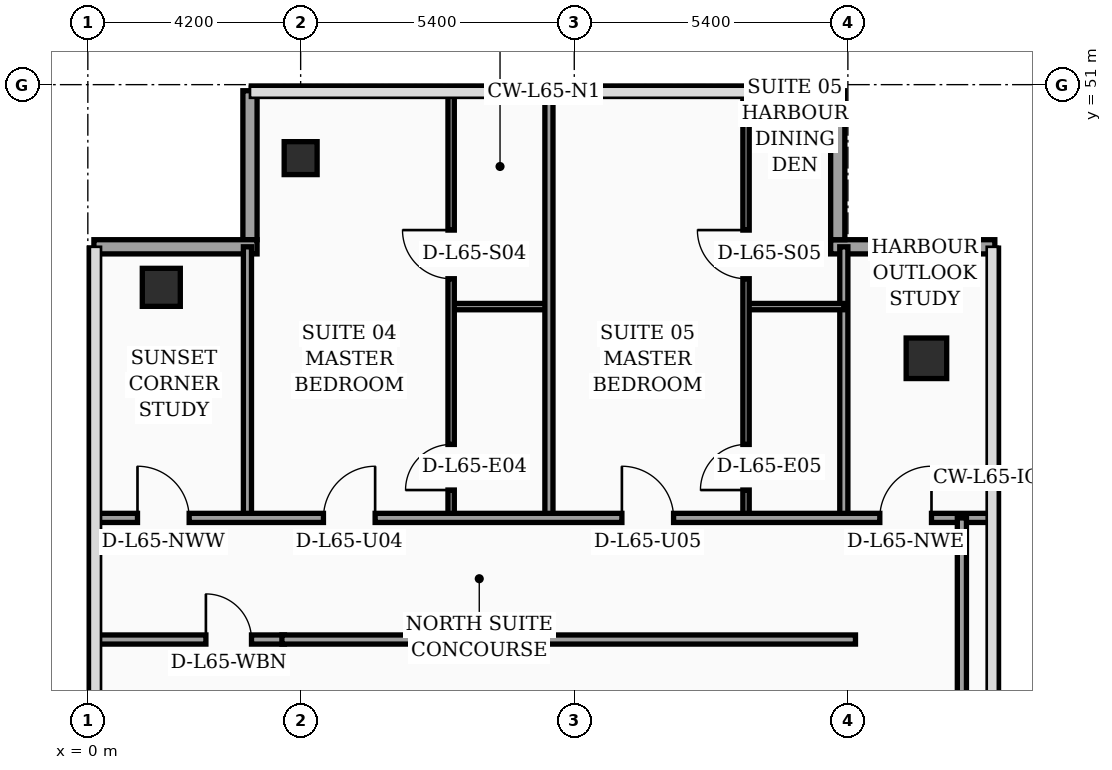
"""IFC4 building model, lengths in metres.
Left out: names, types, materials, properties, quantities, classifications, styles, units other than length and angle.
Written with IfcOpenShell. Run it as: python <this file> out.ifc"""

import sys

from ifc_helpers import new_model, si_unit, direction, frame, frame_2d, origin, origin_2d, place, context, subcontext, project, spatial, rectangle, hollow_rectangle, extrude, element, fill, save


model = new_model("IFC4")
c1 = context("Model", 3, precision=1e-05, world=origin(), true_north=direction((0.0, 1.0)))
c2 = subcontext(c1, "Body", "Model", "MODEL_VIEW")
j1 = project(units=[si_unit("LENGTHUNIT", "METRE"), si_unit("PLANEANGLEUNIT", "RADIAN")], contexts=[c1])
p1 = place(None, origin())
s1 = spatial("IfcSite", under=j1, at=p1, CompositionType="ELEMENT")
p2 = place(p1, origin())
s2 = spatial("IfcBuilding", under=s1, at=p2, CompositionType="ELEMENT")
p3 = place(p2, frame((0.0, 0.0, 263.5)))
s3 = spatial("IfcBuildingStorey", under=s2, at=p3, CompositionType="ELEMENT", Elevation=263.5)
p4 = place(p3, frame((1.45, 47.0, 0.0), z_axis=(0.0, 0.0, 1.0), x_axis=(1.0, 0.0, 0.0)))
e1 = element("IfcColumn", 1, at=p4, inside=s3, PredefinedType="COLUMN", context=c2, shape_type="SweptSolid", body=[
    extrude(hollow_rectangle(XDim=0.75, YDim=0.75, WallThickness=0.032, at=origin_2d()), origin(), (0.0, 0.0, 1.0), 3.56),
])
p5 = place(p3, frame((4.2, 49.55, 0.0), z_axis=(0.0, 0.0, 1.0), x_axis=(1.0, 0.0, 0.0)))
e2 = element("IfcColumn", 2, at=p5, inside=s3, PredefinedType="COLUMN", context=c2, shape_type="SweptSolid", body=[
    extrude(hollow_rectangle(XDim=0.65, YDim=0.65, WallThickness=0.028, at=origin_2d()), origin(), (0.0, 0.0, 1.0), 3.56),
])
p6 = place(p3, frame((16.55, 45.6, 0.0), z_axis=(0.0, 0.0, 1.0), x_axis=(1.0, 0.0, 0.0)))
e3 = element("IfcColumn", 3, at=p6, inside=s3, PredefinedType="COLUMN", context=c2, shape_type="SweptSolid", body=[
    extrude(rectangle(XDim=0.8, YDim=0.8, at=origin_2d()), origin(), (0.0, 0.0, 1.0), 3.56),
])
p7 = place(p3, frame((17.9, 47.8, 0.0), z_axis=(0.0, 0.0, 1.0), x_axis=(-1.0, 0.0, 0.0)))
e4 = element("IfcWall", 4, at=p7, inside=s3, PredefinedType="SOLIDWALL", context=c2, shape_type="SweptSolid", body=[
    extrude(rectangle(XDim=3.24, YDim=0.28, at=frame_2d((1.62, 0.0))), origin(), (0.0, 0.0, 1.0), 3.56),
])
p8 = place(p3, frame((14.8, 47.94, 0.0), z_axis=(0.0, 0.0, 1.0), x_axis=(0.0, 1.0, 0.0)))
e5 = element("IfcWall", 5, at=p8, inside=s3, PredefinedType="SOLIDWALL", context=c2, shape_type="SweptSolid", body=[
    extrude(rectangle(XDim=2.94, YDim=0.28, at=frame_2d((1.47, 0.0))), origin(), (0.0, 0.0, 1.0), 3.56),
])
p9 = place(p3, frame((3.2, 50.88, 0.0), z_axis=(0.0, 0.0, 1.0), x_axis=(0.0, -1.0, 0.0)))
e6 = element("IfcWall", 6, at=p9, inside=s3, PredefinedType="SOLIDWALL", context=c2, shape_type="SweptSolid", body=[
    extrude(rectangle(XDim=2.94, YDim=0.28, at=frame_2d((1.47, 0.0))), origin(), (0.0, 0.0, 1.0), 3.09),
])
p10 = place(p3, frame((3.34, 47.8, 0.0), z_axis=(0.0, 0.0, 1.0), x_axis=(-1.0, 0.0, 0.0)))
e7 = element("IfcWall", 7, at=p10, inside=s3, PredefinedType="SOLIDWALL", context=c2, shape_type="SweptSolid", body=[
    extrude(rectangle(XDim=3.22, YDim=0.28, at=frame_2d((1.61, 0.0))), origin(), (0.0, 0.0, 1.0), 3.09),
])
p11 = place(p3, frame((0.08, 40.05, 0.0), z_axis=(0.0, 0.0, 1.0), x_axis=(1.0, 0.0, 0.0)))
e8 = element("IfcWall", 8, at=p11, inside=s3, PredefinedType="PARTITIONING", context=c2, shape_type="SweptSolid", body=[
    extrude(rectangle(XDim=3.8, YDim=0.18, at=frame_2d((1.9, 0.0))), origin(), (0.0, 0.0, 1.0), 2.99),
])
p12 = place(p11, frame((2.25, 0.0, 0.0)))
e9 = element("IfcOpeningElement", 9, at=p12, cuts=e8, PredefinedType="OPENING", context=c2, shape_type="SweptSolid", body=[
    extrude(rectangle(XDim=0.9, YDim=2.15, at=frame_2d((0.45, 1.075))), frame((0.0, 0.1, 0.0), z_axis=(0.0, -1.0, 0.0), x_axis=(1.0, 0.0, 0.0)), (0.0, 0.0, 1.0), 0.2),
])
p13 = place(p3, frame((3.15, 42.45, 0.0), z_axis=(0.0, 0.0, 1.0), x_axis=(0.0, 1.0, 0.0)))
e10 = element("IfcWall", 10, at=p13, inside=s3, PredefinedType="PARTITIONING", context=c2, shape_type="SweptSolid", body=[
    extrude(rectangle(XDim=5.35, YDim=0.16, at=frame_2d((2.675, 0.0))), origin(), (0.0, 0.0, 1.0), 3.14),
])
p14 = place(p3, frame((14.92, 42.45, 0.0), z_axis=(0.0, 0.0, 1.0), x_axis=(0.0, 1.0, 0.0)))
e11 = element("IfcWall", 11, at=p14, inside=s3, PredefinedType="PARTITIONING", context=c2, shape_type="SweptSolid", body=[
    extrude(rectangle(XDim=5.35, YDim=0.16, at=frame_2d((2.675, 0.0))), origin(), (0.0, 0.0, 1.0), 3.09),
])
p15 = place(p3, frame((7.17, 46.62, 0.0), z_axis=(0.0, 0.0, 1.0), x_axis=(1.0, 0.0, 0.0)))
e12 = element("IfcWall", 12, at=p15, inside=s3, PredefinedType="PARTITIONING", context=c2, shape_type="SweptSolid", body=[
    extrude(rectangle(XDim=1.93, YDim=0.125, at=frame_2d((0.965, 0.0))), origin(), (0.0, 0.0, 1.0), 3.56),
])
p16 = place(p3, frame((7.17, 42.45, 0.0), z_axis=(0.0, 0.0, 1.0), x_axis=(0.0, 1.0, 0.0)))
e13 = element("IfcWall", 13, at=p16, inside=s3, PredefinedType="PARTITIONING", context=c2, shape_type="SweptSolid", body=[
    extrude(rectangle(XDim=8.49, YDim=0.125, at=frame_2d((4.245, 0.0))), origin(), (0.0, 0.0, 1.0), 3.09),
])
p17 = place(p16, frame((0.55, 0.0, 0.0)))
e14 = element("IfcOpeningElement", 14, at=p17, cuts=e13, PredefinedType="OPENING", context=c2, shape_type="SweptSolid", body=[
    extrude(rectangle(XDim=0.9, YDim=2.15, at=frame_2d((0.45, 1.075))), frame((0.0, 0.073, 0.0), z_axis=(0.0, -1.0, 0.0), x_axis=(1.0, 0.0, 0.0)), (0.0, 0.0, 1.0), 0.145),
])
p18 = place(p16, frame((4.72, 0.0, 0.0)))
e15 = element("IfcOpeningElement", 15, at=p18, cuts=e13, PredefinedType="OPENING", context=c2, shape_type="SweptSolid", body=[
    extrude(rectangle(XDim=0.96, YDim=2.2, at=frame_2d((0.48, 1.1))), frame((0.0, 0.073, 0.0), z_axis=(0.0, -1.0, 0.0), x_axis=(1.0, 0.0, 0.0)), (0.0, 0.0, 1.0), 0.145),
])
p19 = place(p3, frame((12.99, 46.62, 0.0), z_axis=(0.0, 0.0, 1.0), x_axis=(1.0, 0.0, 0.0)))
e16 = element("IfcWall", 16, at=p19, inside=s3, PredefinedType="PARTITIONING", context=c2, shape_type="SweptSolid", body=[
    extrude(rectangle(XDim=1.93, YDim=0.125, at=frame_2d((0.965, 0.0))), origin(), (0.0, 0.0, 1.0), 3.09),
])
p20 = place(p3, frame((12.99, 42.45, 0.0), z_axis=(0.0, 0.0, 1.0), x_axis=(0.0, 1.0, 0.0)))
e17 = element("IfcWall", 17, at=p20, inside=s3, PredefinedType="PARTITIONING", context=c2, shape_type="SweptSolid", body=[
    extrude(rectangle(XDim=8.49, YDim=0.125, at=frame_2d((4.245, 0.0))), origin(), (0.0, 0.0, 1.0), 3.09),
])
p21 = place(p20, frame((0.55, 0.0, 0.0)))
e18 = element("IfcOpeningElement", 18, at=p21, cuts=e17, PredefinedType="OPENING", context=c2, shape_type="SweptSolid", body=[
    extrude(rectangle(XDim=0.9, YDim=2.15, at=frame_2d((0.45, 1.075))), frame((0.0, 0.073, 0.0), z_axis=(0.0, -1.0, 0.0), x_axis=(1.0, 0.0, 0.0)), (0.0, 0.0, 1.0), 0.145),
])
p22 = place(p20, frame((4.72, 0.0, 0.0)))
e19 = element("IfcOpeningElement", 19, at=p22, cuts=e17, PredefinedType="OPENING", context=c2, shape_type="SweptSolid", body=[
    extrude(rectangle(XDim=0.96, YDim=2.2, at=frame_2d((0.48, 1.1))), frame((0.0, 0.073, 0.0), z_axis=(0.0, -1.0, 0.0), x_axis=(1.0, 0.0, 0.0)), (0.0, 0.0, 1.0), 0.145),
])
p23 = place(p3, frame((9.1, 42.45, 0.0), z_axis=(0.0, 0.0, 1.0), x_axis=(0.0, 1.0, 0.0)))
e20 = element("IfcWall", 20, at=p23, inside=s3, PredefinedType="PARTITIONING", context=c2, shape_type="SweptSolid", body=[
    extrude(rectangle(XDim=8.49, YDim=0.16, at=frame_2d((4.245, 0.0))), origin(), (0.0, 0.0, 1.0), 3.09),
])
p24 = place(p3, frame((0.08, 42.45, 0.0), z_axis=(0.0, 0.0, 1.0), x_axis=(1.0, 0.0, 0.0)))
e21 = element("IfcWall", 21, at=p24, inside=s3, PredefinedType="PARTITIONING", context=c2, shape_type="SweptSolid", body=[
    extrude(rectangle(XDim=17.77, YDim=0.18, at=frame_2d((8.885, 0.0))), origin(), (0.0, 0.0, 1.0), 2.99),
])
p25 = place(p24, frame((0.9, 0.0, 0.0)))
e22 = element("IfcOpeningElement", 22, at=p25, cuts=e21, PredefinedType="OPENING", context=c2, shape_type="SweptSolid", body=[
    extrude(rectangle(XDim=1.02, YDim=2.2, at=frame_2d((0.51, 1.1))), frame((0.0, 0.1, 0.0), z_axis=(0.0, -1.0, 0.0), x_axis=(1.0, 0.0, 0.0)), (0.0, 0.0, 1.0), 0.2),
])
p26 = place(p24, frame((4.57, 0.0, 0.0)))
e23 = element("IfcOpeningElement", 23, at=p26, cuts=e21, PredefinedType="OPENING", context=c2, shape_type="SweptSolid", body=[
    extrude(rectangle(XDim=1.02, YDim=2.2, at=frame_2d((0.51, 1.1))), frame((0.0, 0.1, 0.0), z_axis=(0.0, -1.0, 0.0), x_axis=(1.0, 0.0, 0.0)), (0.0, 0.0, 1.0), 0.2),
])
p27 = place(p24, frame((10.46, 0.0, 0.0)))
e24 = element("IfcOpeningElement", 24, at=p27, cuts=e21, PredefinedType="OPENING", context=c2, shape_type="SweptSolid", body=[
    extrude(rectangle(XDim=1.02, YDim=2.2, at=frame_2d((0.51, 1.1))), frame((0.0, 0.1, 0.0), z_axis=(0.0, -1.0, 0.0), x_axis=(1.0, 0.0, 0.0)), (0.0, 0.0, 1.0), 0.2),
])
p28 = place(p24, frame((15.55, 0.0, 0.0)))
e25 = element("IfcOpeningElement", 25, at=p28, cuts=e21, PredefinedType="OPENING", context=c2, shape_type="SweptSolid", body=[
    extrude(rectangle(XDim=1.02, YDim=2.2, at=frame_2d((0.51, 1.1))), frame((0.0, 0.1, 0.0), z_axis=(0.0, -1.0, 0.0), x_axis=(1.0, 0.0, 0.0)), (0.0, 0.0, 1.0), 0.2),
])
p29 = place(p3, frame((17.25, 24.3, 0.0), z_axis=(0.0, 0.0, 1.0), x_axis=(0.0, 1.0, 0.0)))
e26 = element("IfcWall", 26, at=p29, inside=s3, PredefinedType="PARTITIONING", context=c2, shape_type="SweptSolid", body=[
    extrude(rectangle(XDim=18.15, YDim=0.18, at=frame_2d((9.075, 0.0))), origin(), (0.0, 0.0, 1.0), 2.99),
])
p30 = place(p29, frame((3.2, 0.0, 0.0)))
e27 = element("IfcOpeningElement", 27, at=p30, cuts=e26, PredefinedType="OPENING", context=c2, shape_type="SweptSolid", body=[
    extrude(rectangle(XDim=1.02, YDim=2.2, at=frame_2d((0.51, 1.1))), frame((0.0, 0.1, 0.0), z_axis=(0.0, -1.0, 0.0), x_axis=(1.0, 0.0, 0.0)), (0.0, 0.0, 1.0), 0.2),
])
p31 = place(p3, frame((3.83, 40.05, 0.0), z_axis=(0.0, 0.0, 1.0), x_axis=(1.0, 0.0, 0.0)))
e28 = element("IfcWall", 28, at=p31, inside=s3, PredefinedType="PARTITIONING", context=c2, shape_type="SweptSolid", body=[
    extrude(rectangle(XDim=11.32, YDim=0.18, at=frame_2d((5.66, 0.0))), origin(), (0.0, 0.0, 1.0), 2.99),
])
p32 = place(p12, origin())
e29 = element("IfcDoor", 29, at=p32, inside=s3, OperationType="SINGLE_SWING_LEFT", PredefinedType="DOOR", context=c2, shape_type="SweptSolid", body=[
    extrude(rectangle(XDim=0.9, YDim=2.15, at=frame_2d((0.45, 1.075))), frame((0.0, 0.025, 0.0), z_axis=(0.0, -1.0, 0.0), x_axis=(1.0, 0.0, 0.0)), (0.0, 0.0, 1.0), 0.05),
])
fill(e9, e29)
p33 = place(p17, origin())
e30 = element("IfcDoor", 30, at=p33, inside=s3, OperationType="SINGLE_SWING_LEFT", PredefinedType="DOOR", context=c2, shape_type="SweptSolid", body=[
    extrude(rectangle(XDim=0.9, YDim=2.15, at=frame_2d((0.45, 1.075))), frame((0.0, 0.025, 0.0), z_axis=(0.0, -1.0, 0.0), x_axis=(1.0, 0.0, 0.0)), (0.0, 0.0, 1.0), 0.05),
])
fill(e14, e30)
p34 = place(p18, origin())
e31 = element("IfcDoor", 31, at=p34, inside=s3, OperationType="SINGLE_SWING_RIGHT", PredefinedType="DOOR", context=c2, shape_type="SweptSolid", body=[
    extrude(rectangle(XDim=0.96, YDim=2.2, at=frame_2d((0.48, 1.1))), frame((0.0, 0.025, 0.0), z_axis=(0.0, -1.0, 0.0), x_axis=(1.0, 0.0, 0.0)), (0.0, 0.0, 1.0), 0.05),
])
fill(e15, e31)
p35 = place(p21, origin())
e32 = element("IfcDoor", 32, at=p35, inside=s3, OperationType="SINGLE_SWING_LEFT", PredefinedType="DOOR", context=c2, shape_type="SweptSolid", body=[
    extrude(rectangle(XDim=0.9, YDim=2.15, at=frame_2d((0.45, 1.075))), frame((0.0, 0.025, 0.0), z_axis=(0.0, -1.0, 0.0), x_axis=(1.0, 0.0, 0.0)), (0.0, 0.0, 1.0), 0.05),
])
fill(e18, e32)
p36 = place(p22, origin())
e33 = element("IfcDoor", 33, at=p36, inside=s3, OperationType="SINGLE_SWING_RIGHT", PredefinedType="DOOR", context=c2, shape_type="SweptSolid", body=[
    extrude(rectangle(XDim=0.96, YDim=2.2, at=frame_2d((0.48, 1.1))), frame((0.0, 0.025, 0.0), z_axis=(0.0, -1.0, 0.0), x_axis=(1.0, 0.0, 0.0)), (0.0, 0.0, 1.0), 0.05),
])
fill(e19, e33)
p37 = place(p25, origin())
e34 = element("IfcDoor", 34, at=p37, inside=s3, OperationType="SINGLE_SWING_LEFT", PredefinedType="DOOR", context=c2, shape_type="SweptSolid", body=[
    extrude(rectangle(XDim=1.02, YDim=2.2, at=frame_2d((0.51, 1.1))), frame((0.0, 0.025, 0.0), z_axis=(0.0, -1.0, 0.0), x_axis=(1.0, 0.0, 0.0)), (0.0, 0.0, 1.0), 0.05),
])
fill(e22, e34)
p38 = place(p26, origin())
e35 = element("IfcDoor", 35, at=p38, inside=s3, OperationType="SINGLE_SWING_RIGHT", PredefinedType="DOOR", context=c2, shape_type="SweptSolid", body=[
    extrude(rectangle(XDim=1.02, YDim=2.2, at=frame_2d((0.51, 1.1))), frame((0.0, 0.025, 0.0), z_axis=(0.0, -1.0, 0.0), x_axis=(1.0, 0.0, 0.0)), (0.0, 0.0, 1.0), 0.05),
])
fill(e23, e35)
p39 = place(p27, origin())
e36 = element("IfcDoor", 36, at=p39, inside=s3, OperationType="SINGLE_SWING_LEFT", PredefinedType="DOOR", context=c2, shape_type="SweptSolid", body=[
    extrude(rectangle(XDim=1.02, YDim=2.2, at=frame_2d((0.51, 1.1))), frame((0.0, 0.025, 0.0), z_axis=(0.0, -1.0, 0.0), x_axis=(1.0, 0.0, 0.0)), (0.0, 0.0, 1.0), 0.05),
])
fill(e24, e36)
p40 = place(p28, origin())
e37 = element("IfcDoor", 37, at=p40, inside=s3, OperationType="SINGLE_SWING_RIGHT", PredefinedType="DOOR", context=c2, shape_type="SweptSolid", body=[
    extrude(rectangle(XDim=1.02, YDim=2.2, at=frame_2d((0.51, 1.1))), frame((0.0, 0.025, 0.0), z_axis=(0.0, -1.0, 0.0), x_axis=(1.0, 0.0, 0.0)), (0.0, 0.0, 1.0), 0.05),
])
fill(e25, e37)
save(model, sys.argv[1])
